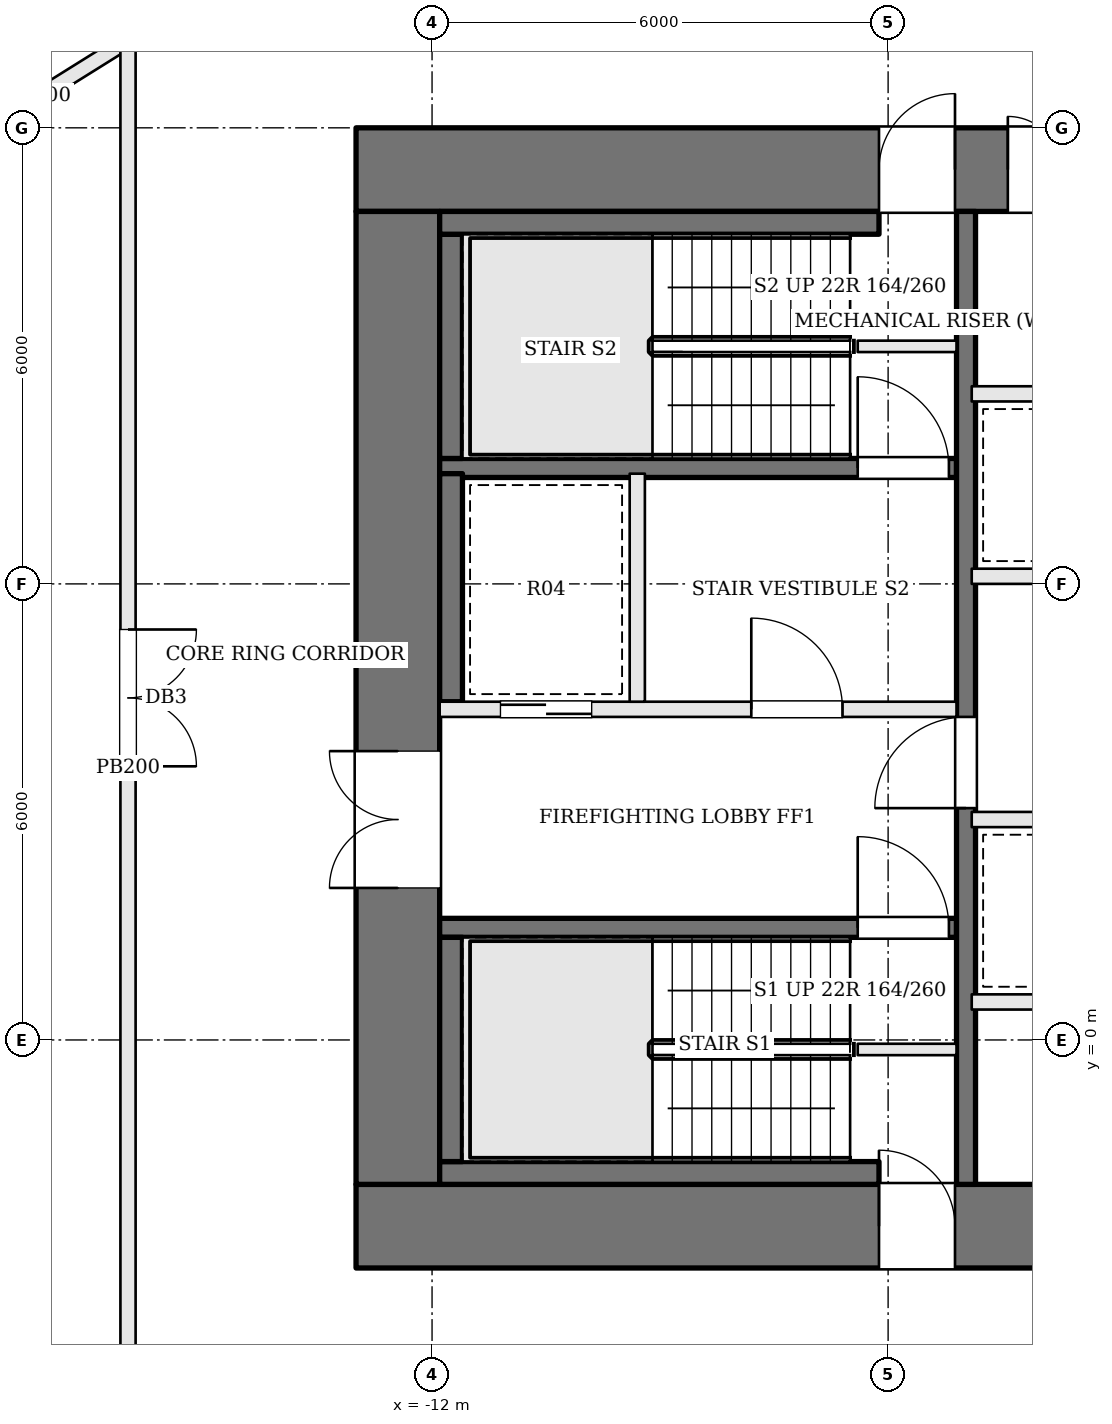
"""IFC4 building model, lengths in metres.
Left out: names, types, materials, properties, quantities, classifications, styles, units other than length and angle.
Written with IfcOpenShell. Run it as: python <this file> out.ifc"""

import sys

from ifc_helpers import new_model, si_unit, direction, frame, frame_2d, origin, place, context, subcontext, project, spatial, rectangle, extrude, element, fill, save


model = new_model("IFC4")
c1 = context("Model", 3, precision=1e-05, world=origin(), true_north=direction((0.0, 1.0)))
c2 = subcontext(c1, "Body", "Model", "MODEL_VIEW")
j1 = project(units=[si_unit("LENGTHUNIT", "METRE"), si_unit("PLANEANGLEUNIT", "RADIAN")], contexts=[c1])
p1 = place(None, origin())
s1 = spatial("IfcSite", under=j1, at=p1, CompositionType="ELEMENT")
p2 = place(p1, origin())
s2 = spatial("IfcBuilding", under=s1, at=p2, CompositionType="ELEMENT")
p3 = place(p2, frame((0.0, 0.0, 106.8)))
s3 = spatial("IfcBuildingStorey", under=s2, at=p3, CompositionType="ELEMENT", Elevation=106.8)
p4 = place(p3, frame((-13.0, 11.45, 0.0), z_axis=(0.0, 0.0, 1.0), x_axis=(1.0, 0.0, 0.0)))
e1 = element("IfcWall", 1, at=p4, inside=s3, PredefinedType="SHEAR", context=c2, shape_type="SweptSolid", body=[
    extrude(rectangle(XDim=26.0, YDim=1.1, at=frame_2d((13.0, 0.0))), origin(), (0.0, 0.0, 1.0), 3.6),
])
p5 = place(p4, frame((8.575, 0.0, 0.0)))
e2 = element("IfcOpeningElement", 2, at=p5, cuts=e1, PredefinedType="OPENING", context=c2, shape_type="SweptSolid", body=[
    extrude(rectangle(XDim=0.7, YDim=2.1, at=frame_2d((0.35, 1.05))), frame((0.0, 0.56, 0.0), z_axis=(0.0, -1.0, 0.0), x_axis=(1.0, 0.0, 0.0)), (0.0, 0.0, 1.0), 1.12),
])
p6 = place(p4, frame((10.875, 0.0, 0.0)))
e3 = element("IfcOpeningElement", 3, at=p6, cuts=e1, PredefinedType="OPENING", context=c2, shape_type="SweptSolid", body=[
    extrude(rectangle(XDim=1.0, YDim=2.1, at=frame_2d((0.5, 1.05))), frame((0.0, 0.56, 0.0), z_axis=(0.0, -1.0, 0.0), x_axis=(1.0, 0.0, 0.0)), (0.0, 0.0, 1.0), 1.12),
])
p7 = place(p4, frame((13.875, 0.0, 0.0)))
e4 = element("IfcOpeningElement", 4, at=p7, cuts=e1, PredefinedType="OPENING", context=c2, shape_type="SweptSolid", body=[
    extrude(rectangle(XDim=0.7, YDim=2.1, at=frame_2d((0.35, 1.05))), frame((0.0, 0.56, 0.0), z_axis=(0.0, -1.0, 0.0), x_axis=(1.0, 0.0, 0.0)), (0.0, 0.0, 1.0), 1.12),
])
p8 = place(p4, frame((16.325, 0.0, 0.0)))
e5 = element("IfcOpeningElement", 5, at=p8, cuts=e1, PredefinedType="OPENING", context=c2, shape_type="SweptSolid", body=[
    extrude(rectangle(XDim=0.7, YDim=2.1, at=frame_2d((0.35, 1.05))), frame((0.0, 0.56, 0.0), z_axis=(0.0, -1.0, 0.0), x_axis=(1.0, 0.0, 0.0)), (0.0, 0.0, 1.0), 1.12),
])
p9 = place(p4, frame((6.88, 0.0, 0.0)))
e6 = element("IfcOpeningElement", 6, at=p9, cuts=e1, PredefinedType="OPENING", context=c2, shape_type="SweptSolid", body=[
    extrude(rectangle(XDim=1.0, YDim=2.1, at=frame_2d((0.5, 1.05))), frame((0.0, 0.56, 0.0), z_axis=(0.0, -1.0, 0.0), x_axis=(1.0, 0.0, 0.0)), (0.0, 0.0, 1.0), 1.12),
])
p10 = place(p4, frame((18.12, 0.0, 0.0)))
e7 = element("IfcOpeningElement", 7, at=p10, cuts=e1, PredefinedType="OPENING", context=c2, shape_type="SweptSolid", body=[
    extrude(rectangle(XDim=1.0, YDim=2.1, at=frame_2d((0.5, 1.05))), frame((0.0, 0.56, 0.0), z_axis=(0.0, -1.0, 0.0), x_axis=(1.0, 0.0, 0.0)), (0.0, 0.0, 1.0), 1.12),
])
p11 = place(p3, frame((-13.0, -2.45, 0.0), z_axis=(0.0, 0.0, 1.0), x_axis=(1.0, 0.0, 0.0)))
e8 = element("IfcWall", 8, at=p11, inside=s3, PredefinedType="SHEAR", context=c2, shape_type="SweptSolid", body=[
    extrude(rectangle(XDim=26.0, YDim=1.1, at=frame_2d((13.0, 0.0))), origin(), (0.0, 0.0, 1.0), 3.6),
])
p12 = place(p11, frame((8.975, 0.0, 0.0)))
e9 = element("IfcOpeningElement", 9, at=p12, cuts=e8, PredefinedType="OPENING", context=c2, shape_type="SweptSolid", body=[
    extrude(rectangle(XDim=0.7, YDim=2.1, at=frame_2d((0.35, 1.05))), frame((0.0, 0.56, 0.0), z_axis=(0.0, -1.0, 0.0), x_axis=(1.0, 0.0, 0.0)), (0.0, 0.0, 1.0), 1.12),
])
p13 = place(p11, frame((11.675, 0.0, 0.0)))
e10 = element("IfcOpeningElement", 10, at=p13, cuts=e8, PredefinedType="OPENING", context=c2, shape_type="SweptSolid", body=[
    extrude(rectangle(XDim=1.0, YDim=2.1, at=frame_2d((0.5, 1.05))), frame((0.0, 0.56, 0.0), z_axis=(0.0, -1.0, 0.0), x_axis=(1.0, 0.0, 0.0)), (0.0, 0.0, 1.0), 1.12),
])
p14 = place(p11, frame((14.275, 0.0, 0.0)))
e11 = element("IfcOpeningElement", 11, at=p14, cuts=e8, PredefinedType="OPENING", context=c2, shape_type="SweptSolid", body=[
    extrude(rectangle(XDim=0.7, YDim=2.1, at=frame_2d((0.35, 1.05))), frame((0.0, 0.56, 0.0), z_axis=(0.0, -1.0, 0.0), x_axis=(1.0, 0.0, 0.0)), (0.0, 0.0, 1.0), 1.12),
])
p15 = place(p11, frame((16.225, 0.0, 0.0)))
e12 = element("IfcOpeningElement", 12, at=p15, cuts=e8, PredefinedType="OPENING", context=c2, shape_type="SweptSolid", body=[
    extrude(rectangle(XDim=0.9, YDim=2.1, at=frame_2d((0.45, 1.05))), frame((0.0, 0.56, 0.0), z_axis=(0.0, -1.0, 0.0), x_axis=(1.0, 0.0, 0.0)), (0.0, 0.0, 1.0), 1.12),
])
p16 = place(p11, frame((6.88, 0.0, 0.0)))
e13 = element("IfcOpeningElement", 13, at=p16, cuts=e8, PredefinedType="OPENING", context=c2, shape_type="SweptSolid", body=[
    extrude(rectangle(XDim=1.0, YDim=2.1, at=frame_2d((0.5, 1.05))), frame((0.0, 0.56, 0.0), z_axis=(0.0, -1.0, 0.0), x_axis=(1.0, 0.0, 0.0)), (0.0, 0.0, 1.0), 1.12),
])
p17 = place(p11, frame((18.12, 0.0, 0.0)))
e14 = element("IfcOpeningElement", 14, at=p17, cuts=e8, PredefinedType="OPENING", context=c2, shape_type="SweptSolid", body=[
    extrude(rectangle(XDim=1.0, YDim=2.1, at=frame_2d((0.5, 1.05))), frame((0.0, 0.56, 0.0), z_axis=(0.0, -1.0, 0.0), x_axis=(1.0, 0.0, 0.0)), (0.0, 0.0, 1.0), 1.12),
])
p18 = place(p3, frame((-12.45, -1.9, 0.0), z_axis=(0.0, 0.0, 1.0), x_axis=(0.0, 1.0, 0.0)))
e15 = element("IfcWall", 15, at=p18, inside=s3, PredefinedType="SHEAR", context=c2, shape_type="SweptSolid", body=[
    extrude(rectangle(XDim=12.8, YDim=1.1, at=frame_2d((6.4, 0.0))), origin(), (0.0, 0.0, 1.0), 3.6),
])
p19 = place(p18, frame((3.9, 0.0, 0.0)))
e16 = element("IfcOpeningElement", 16, at=p19, cuts=e15, PredefinedType="OPENING", context=c2, shape_type="SweptSolid", body=[
    extrude(rectangle(XDim=1.8, YDim=2.1, at=frame_2d((0.9, 1.05))), frame((0.0, 0.56, 0.0), z_axis=(0.0, -1.0, 0.0), x_axis=(1.0, 0.0, 0.0)), (0.0, 0.0, 1.0), 1.12),
])
for number, where, z_axis, x_axis in (
    (17, (-6.4, -0.125, 0.0), (0.0, 0.0, 1.0), (1.0, 0.0, 0.0)),
    (18, (-6.4, 9.125, 0.0), (0.0, 0.0, 1.0), (1.0, 0.0, 0.0)),
):
    element("IfcWall", number, at=place(p3, frame(where, z_axis=z_axis, x_axis=x_axis)), inside=s3, PredefinedType="SOLIDWALL", context=c2, shape_type="SweptSolid", body=[
        extrude(rectangle(XDim=1.3, YDim=0.15, at=frame_2d((0.65, 0.0))), origin(), (0.0, 0.0, 1.0), 3.4),
    ])
p20 = place(p3, frame((-11.9, 1.475, 0.0), z_axis=(0.0, 0.0, 1.0), x_axis=(1.0, 0.0, 0.0)))
e19 = element("IfcWall", 19, at=p20, inside=s3, PredefinedType="SOLIDWALL", context=c2, shape_type="SweptSolid", body=[
    extrude(rectangle(XDim=6.8, YDim=0.25, at=frame_2d((3.4, 0.0))), origin(), (0.0, 0.0, 1.0), 3.4),
])
p21 = place(p20, frame((5.5, 0.0, 0.0)))
e20 = element("IfcOpeningElement", 20, at=p21, cuts=e19, PredefinedType="OPENING", context=c2, shape_type="SweptSolid", body=[
    extrude(rectangle(XDim=1.2, YDim=2.1, at=frame_2d((0.6, 1.05))), frame((0.0, 0.135, 0.0), z_axis=(0.0, -1.0, 0.0), x_axis=(1.0, 0.0, 0.0)), (0.0, 0.0, 1.0), 0.27),
])
p22 = place(p3, frame((-11.9, 4.35, 0.0), z_axis=(0.0, 0.0, 1.0), x_axis=(1.0, 0.0, 0.0)))
e21 = element("IfcWall", 21, at=p22, inside=s3, PredefinedType="SOLIDWALL", context=c2, shape_type="SweptSolid", body=[
    extrude(rectangle(XDim=6.8, YDim=0.2, at=frame_2d((3.4, 0.0))), origin(), (0.0, 0.0, 1.0), 3.4),
])
p23 = place(p22, frame((4.1, 0.0, 0.0)))
e22 = element("IfcOpeningElement", 22, at=p23, cuts=e21, PredefinedType="OPENING", context=c2, shape_type="SweptSolid", body=[
    extrude(rectangle(XDim=1.2, YDim=2.1, at=frame_2d((0.6, 1.05))), frame((0.0, 0.11, 0.0), z_axis=(0.0, -1.0, 0.0), x_axis=(1.0, 0.0, 0.0)), (0.0, 0.0, 1.0), 0.22),
])
p24 = place(p22, frame((0.8, 0.0, 0.0)))
e23 = element("IfcOpeningElement", 23, at=p24, cuts=e21, PredefinedType="OPENING", context=c2, shape_type="SweptSolid", body=[
    extrude(rectangle(XDim=1.2, YDim=2.1, at=frame_2d((0.6, 1.05))), frame((0.0, 0.11, 0.0), z_axis=(0.0, -1.0, 0.0), x_axis=(1.0, 0.0, 0.0)), (0.0, 0.0, 1.0), 0.22),
])
p25 = place(p3, frame((-11.9, 7.525, 0.0), z_axis=(0.0, 0.0, 1.0), x_axis=(1.0, 0.0, 0.0)))
e24 = element("IfcWall", 24, at=p25, inside=s3, PredefinedType="SOLIDWALL", context=c2, shape_type="SweptSolid", body=[
    extrude(rectangle(XDim=6.8, YDim=0.25, at=frame_2d((3.4, 0.0))), origin(), (0.0, 0.0, 1.0), 3.4),
])
p26 = place(p25, frame((5.5, 0.0, 0.0)))
e25 = element("IfcOpeningElement", 25, at=p26, cuts=e24, PredefinedType="OPENING", context=c2, shape_type="SweptSolid", body=[
    extrude(rectangle(XDim=1.2, YDim=2.1, at=frame_2d((0.6, 1.05))), frame((0.0, 0.135, 0.0), z_axis=(0.0, -1.0, 0.0), x_axis=(1.0, 0.0, 0.0)), (0.0, 0.0, 1.0), 0.27),
])
p27 = place(p3, frame((-9.3, 4.45, 0.0), z_axis=(0.0, 0.0, 1.0), x_axis=(0.0, 1.0, 0.0)))
e26 = element("IfcWall", 26, at=p27, inside=s3, PredefinedType="SOLIDWALL", context=c2, shape_type="SweptSolid", body=[
    extrude(rectangle(XDim=3.0, YDim=0.2, at=frame_2d((1.5, 0.0))), origin(), (0.0, 0.0, 1.0), 3.4),
])
p28 = place(p3, frame((-4.975, -1.9, 0.0), z_axis=(0.0, 0.0, 1.0), x_axis=(0.0, 1.0, 0.0)))
e27 = element("IfcWall", 27, at=p28, inside=s3, PredefinedType="SOLIDWALL", context=c2, shape_type="SweptSolid", body=[
    extrude(rectangle(XDim=12.8, YDim=0.25, at=frame_2d((6.4, 0.0))), origin(), (0.0, 0.0, 1.0), 3.4),
])
p29 = place(p28, frame((4.95, 0.0, 0.0)))
e28 = element("IfcOpeningElement", 28, at=p29, cuts=e27, PredefinedType="OPENING", context=c2, shape_type="SweptSolid", body=[
    extrude(rectangle(XDim=1.2, YDim=2.1, at=frame_2d((0.6, 1.05))), frame((0.0, 0.135, 0.0), z_axis=(0.0, -1.0, 0.0), x_axis=(1.0, 0.0, 0.0)), (0.0, 0.0, 1.0), 0.27),
])
p30 = place(p3, frame((-11.9, -1.75, 0.0), z_axis=(0.0, 0.0, 1.0), x_axis=(1.0, 0.0, 0.0)))
e29 = element("IfcWall", 29, at=p30, inside=s3, PredefinedType="SOLIDWALL", context=c2, shape_type="SweptSolid", body=[
    extrude(rectangle(XDim=5.78, YDim=0.3, at=frame_2d((2.89, 0.0))), origin(), (0.0, 0.0, 1.0), 3.4),
])
p31 = place(p3, frame((-11.75, -1.6, 0.0), z_axis=(0.0, 0.0, 1.0), x_axis=(0.0, 1.0, 0.0)))
e30 = element("IfcWall", 30, at=p31, inside=s3, PredefinedType="SOLIDWALL", context=c2, shape_type="SweptSolid", body=[
    extrude(rectangle(XDim=2.95, YDim=0.3, at=frame_2d((1.475, 0.0))), origin(), (0.0, 0.0, 1.0), 3.4),
])
p32 = place(p3, frame((-11.75, 4.45, 0.0), z_axis=(0.0, 0.0, 1.0), x_axis=(0.0, 1.0, 0.0)))
e31 = element("IfcWall", 31, at=p32, inside=s3, PredefinedType="SOLIDWALL", context=c2, shape_type="SweptSolid", body=[
    extrude(rectangle(XDim=3.0, YDim=0.3, at=frame_2d((1.5, 0.0))), origin(), (0.0, 0.0, 1.0), 3.4),
])
p33 = place(p3, frame((-11.75, 7.65, 0.0), z_axis=(0.0, 0.0, 1.0), x_axis=(0.0, 1.0, 0.0)))
e32 = element("IfcWall", 32, at=p33, inside=s3, PredefinedType="SOLIDWALL", context=c2, shape_type="SweptSolid", body=[
    extrude(rectangle(XDim=2.95, YDim=0.3, at=frame_2d((1.475, 0.0))), origin(), (0.0, 0.0, 1.0), 3.4),
])
p34 = place(p3, frame((-11.9, 10.75, 0.0), z_axis=(0.0, 0.0, 1.0), x_axis=(1.0, 0.0, 0.0)))
e33 = element("IfcWall", 33, at=p34, inside=s3, PredefinedType="SOLIDWALL", context=c2, shape_type="SweptSolid", body=[
    extrude(rectangle(XDim=5.78, YDim=0.3, at=frame_2d((2.89, 0.0))), origin(), (0.0, 0.0, 1.0), 3.4),
])
for number, where, z_axis, x_axis in (
    (34, (-4.9, 0.5, 0.0), (0.0, 0.0, 1.0), (1.0, 0.0, 0.0)),
    (35, (-4.9, 2.9, 0.0), (0.0, 0.0, 1.0), (1.0, 0.0, 0.0)),
    (36, (-4.9, 6.1, 0.0), (0.0, 0.0, 1.0), (1.0, 0.0, 0.0)),
    (37, (-4.9, 8.5, 0.0), (0.0, 0.0, 1.0), (1.0, 0.0, 0.0)),
):
    element("IfcWall", number, at=place(p3, frame(where, z_axis=z_axis, x_axis=x_axis)), inside=s3, PredefinedType="SOLIDWALL", context=c2, shape_type="SweptSolid", body=[
        extrude(rectangle(XDim=9.8, YDim=0.2, at=frame_2d((4.9, 0.0))), origin(), (0.0, 0.0, 1.0), 3.4),
    ])
p35 = place(p3, frame((-18.422, 11.635, 0.0), z_axis=(0.0, 0.0, 1.0), x_axis=(0.848299824463, 0.529516201656, 0.0)))
e38 = element("IfcWall", 38, at=p35, inside=s3, PredefinedType="PARTITIONING", context=c2, shape_type="SweptSolid", body=[
    extrude(rectangle(XDim=2.955, YDim=0.2, at=frame_2d((1.478, 0.0))), origin(), (0.0, 0.0, 1.0), 3.4),
])
p36 = place(p3, frame((-16.0, 13.047, 0.0), z_axis=(0.0, 0.0, 1.0), x_axis=(0.0, -1.0, 0.0)))
e39 = element("IfcWall", 39, at=p36, inside=s3, PredefinedType="PARTITIONING", context=c2, shape_type="SweptSolid", body=[
    extrude(rectangle(XDim=18.947, YDim=0.2, at=frame_2d((9.474, 0.0))), origin(), (0.0, 0.0, 1.0), 3.4),
])
p37 = place(p36, frame((7.647, 0.0, 0.0)))
e40 = element("IfcOpeningElement", 40, at=p37, cuts=e39, PredefinedType="OPENING", context=c2, shape_type="SweptSolid", body=[
    extrude(rectangle(XDim=1.8, YDim=2.1, at=frame_2d((0.9, 1.05))), frame((0.0, 0.11, 0.0), z_axis=(0.0, -1.0, 0.0), x_axis=(1.0, 0.0, 0.0)), (0.0, 0.0, 1.0), 0.22),
])
p38 = place(p19, origin())
e41 = element("IfcDoor", 41, at=p38, inside=s3, OperationType="DOUBLE_DOOR_SINGLE_SWING", PredefinedType="DOOR", context=c2, shape_type="SweptSolid", body=[
    extrude(rectangle(XDim=1.8, YDim=2.1, at=frame_2d((0.9, 1.05))), frame((0.0, 0.025, 0.0), z_axis=(0.0, -1.0, 0.0), x_axis=(1.0, 0.0, 0.0)), (0.0, 0.0, 1.0), 0.05),
])
fill(e16, e41)
p39 = place(p29, origin())
e42 = element("IfcDoor", 42, at=p39, inside=s3, OperationType="SINGLE_SWING_LEFT", PredefinedType="DOOR", context=c2, shape_type="SweptSolid", body=[
    extrude(rectangle(XDim=1.2, YDim=2.1, at=frame_2d((0.6, 1.05))), frame((0.0, 0.025, 0.0), z_axis=(0.0, -1.0, 0.0), x_axis=(1.0, 0.0, 0.0)), (0.0, 0.0, 1.0), 0.05),
])
fill(e28, e42)
p40 = place(p23, origin())
e43 = element("IfcDoor", 43, at=p40, inside=s3, OperationType="SINGLE_SWING_LEFT", PredefinedType="DOOR", context=c2, shape_type="SweptSolid", body=[
    extrude(rectangle(XDim=1.2, YDim=2.1, at=frame_2d((0.6, 1.05))), frame((0.0, 0.025, 0.0), z_axis=(0.0, -1.0, 0.0), x_axis=(1.0, 0.0, 0.0)), (0.0, 0.0, 1.0), 0.05),
])
fill(e22, e43)
p41 = place(p21, origin())
e44 = element("IfcDoor", 44, at=p41, inside=s3, OperationType="SINGLE_SWING_LEFT", PredefinedType="DOOR", context=c2, shape_type="SweptSolid", body=[
    extrude(rectangle(XDim=1.2, YDim=2.1, at=frame_2d((0.6, 1.05))), frame((0.0, 0.025, 0.0), z_axis=(0.0, -1.0, 0.0), x_axis=(1.0, 0.0, 0.0)), (0.0, 0.0, 1.0), 0.05),
])
fill(e20, e44)
p42 = place(p26, origin())
e45 = element("IfcDoor", 45, at=p42, inside=s3, OperationType="SINGLE_SWING_LEFT", PredefinedType="DOOR", context=c2, shape_type="SweptSolid", body=[
    extrude(rectangle(XDim=1.2, YDim=2.1, at=frame_2d((0.6, 1.05))), frame((0.0, 0.025, 0.0), z_axis=(0.0, -1.0, 0.0), x_axis=(1.0, 0.0, 0.0)), (0.0, 0.0, 1.0), 0.05),
])
fill(e25, e45)
p43 = place(p24, origin())
e46 = element("IfcDoor", 46, at=p43, inside=s3, OperationType="SLIDING_TO_RIGHT", PredefinedType="DOOR", context=c2, shape_type="SweptSolid", body=[
    extrude(rectangle(XDim=1.2, YDim=2.1, at=frame_2d((0.6, 1.05))), frame((0.0, 0.025, 0.0), z_axis=(0.0, -1.0, 0.0), x_axis=(1.0, 0.0, 0.0)), (0.0, 0.0, 1.0), 0.05),
])
fill(e23, e46)
p44 = place(p5, origin())
e47 = element("IfcDoor", 47, at=p44, inside=s3, OperationType="SINGLE_SWING_LEFT", PredefinedType="DOOR", context=c2, shape_type="SweptSolid", body=[
    extrude(rectangle(XDim=0.7, YDim=2.1, at=frame_2d((0.35, 1.05))), frame((0.0, 0.025, 0.0), z_axis=(0.0, -1.0, 0.0), x_axis=(1.0, 0.0, 0.0)), (0.0, 0.0, 1.0), 0.05),
])
fill(e2, e47)
p45 = place(p16, origin())
e48 = element("IfcDoor", 48, at=p45, inside=s3, OperationType="SINGLE_SWING_LEFT", PredefinedType="DOOR", context=c2, shape_type="SweptSolid", body=[
    extrude(rectangle(XDim=1.0, YDim=2.1, at=frame_2d((0.5, 1.05))), frame((0.0, 0.025, 0.0), z_axis=(0.0, -1.0, 0.0), x_axis=(1.0, 0.0, 0.0)), (0.0, 0.0, 1.0), 0.05),
])
fill(e13, e48)
p46 = place(p9, origin())
e49 = element("IfcDoor", 49, at=p46, inside=s3, OperationType="SINGLE_SWING_RIGHT", PredefinedType="DOOR", context=c2, shape_type="SweptSolid", body=[
    extrude(rectangle(XDim=1.0, YDim=2.1, at=frame_2d((0.5, 1.05))), frame((0.0, 0.025, 0.0), z_axis=(0.0, -1.0, 0.0), x_axis=(1.0, 0.0, 0.0)), (0.0, 0.0, 1.0), 0.05),
])
fill(e6, e49)
p47 = place(p37, origin())
e50 = element("IfcDoor", 50, at=p47, inside=s3, OperationType="DOUBLE_DOOR_SINGLE_SWING", PredefinedType="DOOR", context=c2, shape_type="SweptSolid", body=[
    extrude(rectangle(XDim=1.8, YDim=2.1, at=frame_2d((0.9, 1.05))), frame((0.0, 0.025, 0.0), z_axis=(0.0, -1.0, 0.0), x_axis=(1.0, 0.0, 0.0)), (0.0, 0.0, 1.0), 0.05),
])
fill(e40, e50)
save(model, sys.argv[1])
